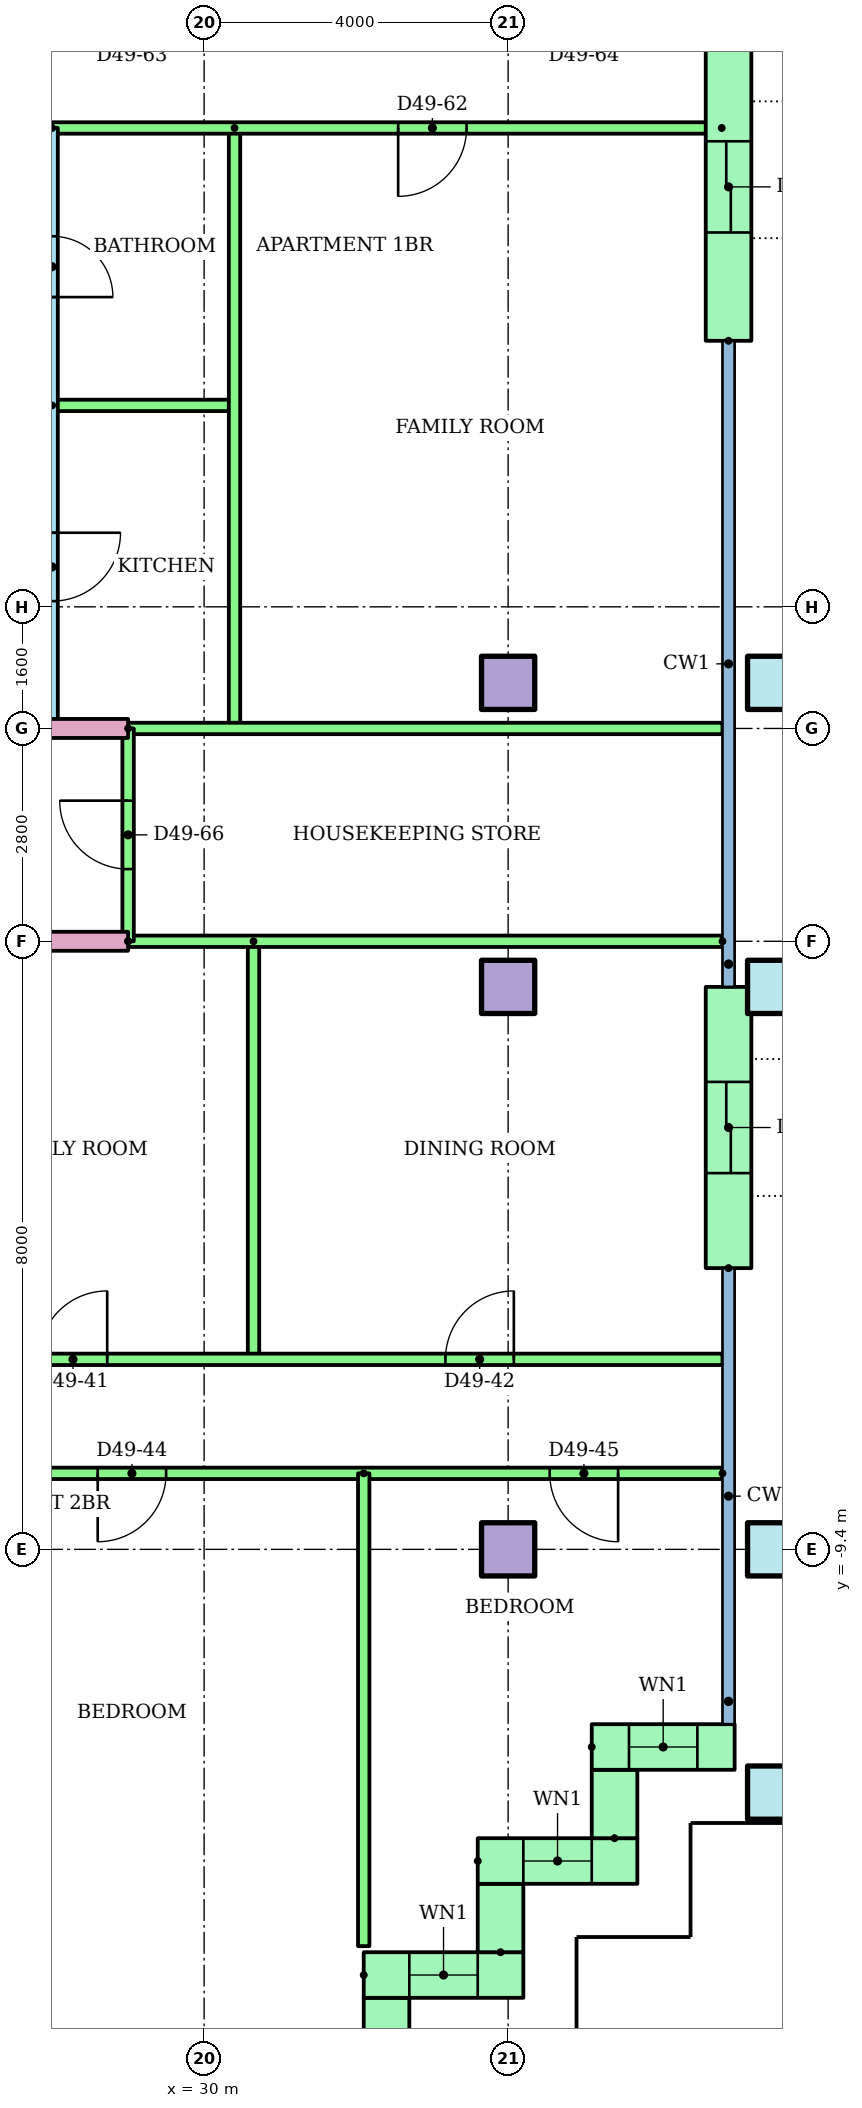
"""IFC4 building model, lengths in metres.
Left out: names, types, materials, properties, quantities, classifications, styles, units other than length and angle.
Written with IfcOpenShell. Run it as: python <this file> out.ifc"""

import sys

from ifc_helpers import new_model, si_unit, direction, frame, frame_2d, origin, origin_2d, place, context, subcontext, project, spatial, rectangle, hollow_rectangle, extrude, element, fill, save


model = new_model("IFC4")
c1 = context("Model", 3, precision=1e-05, world=origin(), true_north=direction((0.0, 1.0)))
c2 = subcontext(c1, "Body", "Model", "MODEL_VIEW")
j1 = project(units=[si_unit("LENGTHUNIT", "METRE"), si_unit("PLANEANGLEUNIT", "RADIAN")], contexts=[c1])
p1 = place(None, origin())
s1 = spatial("IfcSite", under=j1, at=p1, CompositionType="ELEMENT")
p2 = place(p1, origin())
s2 = spatial("IfcBuilding", under=s1, at=p2, CompositionType="ELEMENT")
p3 = place(p2, frame((0.0, 0.0, 187.7)))
s3 = spatial("IfcBuildingStorey", under=s2, at=p3, CompositionType="ELEMENT", Elevation=187.7)
p4 = place(p3, frame((37.5, -12.6, 0.0)))
e1 = element("IfcColumn", 1, at=p4, inside=s3, PredefinedType="COLUMN", context=c2, shape_type="SweptSolid", body=[
    extrude(hollow_rectangle(XDim=0.7, YDim=0.7, WallThickness=0.036, at=origin_2d()), origin(), (0.0, 0.0, 1.0), 3.2),
])
p5 = place(p3, frame((34.0, -9.4, 0.0)))
e2 = element("IfcColumn", 2, at=p5, inside=s3, PredefinedType="COLUMN", context=c2, shape_type="SweptSolid", body=[
    extrude(rectangle(XDim=0.7, YDim=0.7, at=origin_2d()), origin(), (0.0, 0.0, 1.0), 3.2),
])
p6 = place(p3, frame((37.5, -9.4, 0.0)))
e3 = element("IfcColumn", 3, at=p6, inside=s3, PredefinedType="COLUMN", context=c2, shape_type="SweptSolid", body=[
    extrude(hollow_rectangle(XDim=0.7, YDim=0.7, WallThickness=0.036, at=origin_2d()), origin(), (0.0, 0.0, 1.0), 3.2),
])
p7 = place(p3, frame((34.0, -2.0, 0.0)))
e4 = element("IfcColumn", 4, at=p7, inside=s3, PredefinedType="COLUMN", context=c2, shape_type="SweptSolid", body=[
    extrude(rectangle(XDim=0.7, YDim=0.7, at=origin_2d()), origin(), (0.0, 0.0, 1.0), 3.2),
])
p8 = place(p3, frame((37.5, -2.0, 0.0)))
e5 = element("IfcColumn", 5, at=p8, inside=s3, PredefinedType="COLUMN", context=c2, shape_type="SweptSolid", body=[
    extrude(hollow_rectangle(XDim=0.7, YDim=0.7, WallThickness=0.036, at=origin_2d()), origin(), (0.0, 0.0, 1.0), 3.2),
])
p9 = place(p3, frame((34.0, 2.0, 0.0)))
e6 = element("IfcColumn", 6, at=p9, inside=s3, PredefinedType="COLUMN", context=c2, shape_type="SweptSolid", body=[
    extrude(rectangle(XDim=0.7, YDim=0.7, at=origin_2d()), origin(), (0.0, 0.0, 1.0), 3.2),
])
p10 = place(p3, frame((37.5, 2.0, 0.0)))
e7 = element("IfcColumn", 7, at=p10, inside=s3, PredefinedType="COLUMN", context=c2, shape_type="SweptSolid", body=[
    extrude(hollow_rectangle(XDim=0.7, YDim=0.7, WallThickness=0.036, at=origin_2d()), origin(), (0.0, 0.0, 1.0), 3.2),
])
p11 = place(p3, frame((32.4, -16.58, 0.0), z_axis=(0.0, 0.0, 1.0), x_axis=(0.0, 1.0, 0.0)))
e8 = element("IfcWall", 8, at=p11, inside=s3, PredefinedType="STANDARD", context=c2, shape_type="SweptSolid", body=[
    extrude(rectangle(XDim=1.28, YDim=0.6, at=frame_2d((0.64, 0.0))), origin(), (0.0, 0.0, 1.0), 2.92),
])
p12 = place(p3, frame((32.1, -15.0, 0.0)))
e9 = element("IfcWall", 9, at=p12, inside=s3, PredefinedType="STANDARD", context=c2, shape_type="SweptSolid", body=[
    extrude(rectangle(XDim=2.1, YDim=0.6, at=frame_2d((1.05, 0.0))), origin(), (0.0, 0.0, 1.0), 2.92),
])
p13 = place(p12, frame((0.6, 0.0, 0.9)))
e10 = element("IfcOpeningElement", 10, at=p13, cuts=e9, PredefinedType="OPENING", context=c2, shape_type="SweptSolid", body=[
    extrude(rectangle(XDim=0.9, YDim=1.5, at=frame_2d((0.45, 0.75))), frame((0.0, 0.31, 0.0), z_axis=(0.0, -1.0, 0.0), x_axis=(1.0, 0.0, 0.0)), (0.0, 0.0, 1.0), 0.62),
])
p14 = place(p3, frame((33.9, -14.7, 0.0), z_axis=(0.0, 0.0, 1.0), x_axis=(0.0, 1.0, 0.0)))
e11 = element("IfcWall", 11, at=p14, inside=s3, PredefinedType="STANDARD", context=c2, shape_type="SweptSolid", body=[
    extrude(rectangle(XDim=0.9, YDim=0.6, at=frame_2d((0.45, 0.0))), origin(), (0.0, 0.0, 1.0), 2.92),
])
p15 = place(p3, frame((33.6, -13.5, 0.0)))
e12 = element("IfcWall", 12, at=p15, inside=s3, PredefinedType="STANDARD", context=c2, shape_type="SweptSolid", body=[
    extrude(rectangle(XDim=2.1, YDim=0.6, at=frame_2d((1.05, 0.0))), origin(), (0.0, 0.0, 1.0), 2.92),
])
p16 = place(p15, frame((0.6, 0.0, 0.9)))
e13 = element("IfcOpeningElement", 13, at=p16, cuts=e12, PredefinedType="OPENING", context=c2, shape_type="SweptSolid", body=[
    extrude(rectangle(XDim=0.9, YDim=1.5, at=frame_2d((0.45, 0.75))), frame((0.0, 0.31, 0.0), z_axis=(0.0, -1.0, 0.0), x_axis=(1.0, 0.0, 0.0)), (0.0, 0.0, 1.0), 0.62),
])
p17 = place(p3, frame((35.4, -13.2, 0.0), z_axis=(0.0, 0.0, 1.0), x_axis=(0.0, 1.0, 0.0)))
e14 = element("IfcWall", 14, at=p17, inside=s3, PredefinedType="STANDARD", context=c2, shape_type="SweptSolid", body=[
    extrude(rectangle(XDim=0.9, YDim=0.6, at=frame_2d((0.45, 0.0))), origin(), (0.0, 0.0, 1.0), 2.92),
])
p18 = place(p3, frame((35.1, -12.0, 0.0)))
e15 = element("IfcWall", 15, at=p18, inside=s3, PredefinedType="STANDARD", context=c2, shape_type="SweptSolid", body=[
    extrude(rectangle(XDim=1.88, YDim=0.6, at=frame_2d((0.94, 0.0))), origin(), (0.0, 0.0, 1.0), 2.92),
])
p19 = place(p18, frame((0.49, 0.0, 0.9)))
e16 = element("IfcOpeningElement", 16, at=p19, cuts=e15, PredefinedType="OPENING", context=c2, shape_type="SweptSolid", body=[
    extrude(rectangle(XDim=0.9, YDim=1.5, at=frame_2d((0.45, 0.75))), frame((0.0, 0.31, 0.0), z_axis=(0.0, -1.0, 0.0), x_axis=(1.0, 0.0, 0.0)), (0.0, 0.0, 1.0), 0.62),
])
p20 = place(p3, frame((36.9, -5.7, 0.0), z_axis=(0.0, 0.0, 1.0), x_axis=(0.0, 1.0, 0.0)))
e17 = element("IfcWall", 17, at=p20, inside=s3, PredefinedType="STANDARD", context=c2, shape_type="SweptSolid", body=[
    extrude(rectangle(XDim=3.7, YDim=0.6, at=frame_2d((1.85, 0.0))), origin(), (0.0, 0.0, 1.0), 2.92),
])
p21 = place(p20, frame((1.25, 0.0, 0.0)))
e18 = element("IfcOpeningElement", 18, at=p21, cuts=e17, PredefinedType="OPENING", context=c2, shape_type="SweptSolid", body=[
    extrude(rectangle(XDim=1.2, YDim=2.1, at=frame_2d((0.6, 1.05))), frame((0.0, 0.31, 0.0), z_axis=(0.0, -1.0, 0.0), x_axis=(1.0, 0.0, 0.0)), (0.0, 0.0, 1.0), 0.62),
])
p22 = place(p3, frame((36.9, 6.5, 0.0), z_axis=(0.0, 0.0, 1.0), x_axis=(0.0, 1.0, 0.0)))
e19 = element("IfcWall", 19, at=p22, inside=s3, PredefinedType="STANDARD", context=c2, shape_type="SweptSolid", body=[
    extrude(rectangle(XDim=4.5, YDim=0.6, at=frame_2d((2.25, 0.0))), origin(), (0.0, 0.0, 1.0), 2.92),
])
p23 = place(p22, frame((1.425, 0.0, 0.0)))
e20 = element("IfcOpeningElement", 20, at=p23, cuts=e19, PredefinedType="OPENING", context=c2, shape_type="SweptSolid", body=[
    extrude(rectangle(XDim=1.2, YDim=2.1, at=frame_2d((0.6, 1.05))), frame((0.0, 0.31, 0.0), z_axis=(0.0, -1.0, 0.0), x_axis=(1.0, 0.0, 0.0)), (0.0, 0.0, 1.0), 0.62),
])
p24 = place(p3, frame((30.65, -1.4, 0.0), z_axis=(0.0, 0.0, 1.0), x_axis=(0.0, -1.0, 0.0)))
e21 = element("IfcWall", 21, at=p24, inside=s3, PredefinedType="PARTITIONING", context=c2, shape_type="SweptSolid", body=[
    extrude(rectangle(XDim=5.5, YDim=0.15, at=frame_2d((2.75, 0.0))), origin(), (0.0, 0.0, 1.0), 2.4),
])
p25 = place(p3, frame((20.0, -6.9, 0.0)))
e22 = element("IfcWall", 22, at=p25, inside=s3, PredefinedType="PARTITIONING", context=c2, shape_type="SweptSolid", body=[
    extrude(rectangle(XDim=16.82, YDim=0.15, at=frame_2d((8.41, 0.0))), origin(), (0.0, 0.0, 1.0), 2.4),
])
p26 = place(p25, frame((3.7, 0.0, 0.0)))
e23 = element("IfcOpeningElement", 23, at=p26, cuts=e22, PredefinedType="OPENING", context=c2, shape_type="SweptSolid", body=[
    extrude(rectangle(XDim=0.9, YDim=2.1, at=frame_2d((0.45, 1.05))), frame((0.0, 0.085, 0.0), z_axis=(0.0, -1.0, 0.0), x_axis=(1.0, 0.0, 0.0)), (0.0, 0.0, 1.0), 0.17),
])
p27 = place(p25, frame((7.825, 0.0, 0.0)))
e24 = element("IfcOpeningElement", 24, at=p27, cuts=e22, PredefinedType="OPENING", context=c2, shape_type="SweptSolid", body=[
    extrude(rectangle(XDim=0.9, YDim=2.1, at=frame_2d((0.45, 1.05))), frame((0.0, 0.085, 0.0), z_axis=(0.0, -1.0, 0.0), x_axis=(1.0, 0.0, 0.0)), (0.0, 0.0, 1.0), 0.17),
])
p28 = place(p25, frame((13.175, 0.0, 0.0)))
e25 = element("IfcOpeningElement", 25, at=p28, cuts=e22, PredefinedType="OPENING", context=c2, shape_type="SweptSolid", body=[
    extrude(rectangle(XDim=0.9, YDim=2.1, at=frame_2d((0.45, 1.05))), frame((0.0, 0.085, 0.0), z_axis=(0.0, -1.0, 0.0), x_axis=(1.0, 0.0, 0.0)), (0.0, 0.0, 1.0), 0.17),
])
p29 = place(p3, frame((36.82, -8.4, 0.0), z_axis=(0.0, 0.0, 1.0), x_axis=(-1.0, 0.0, 0.0)))
e26 = element("IfcWall", 26, at=p29, inside=s3, PredefinedType="PARTITIONING", context=c2, shape_type="SweptSolid", body=[
    extrude(rectangle(XDim=18.82, YDim=0.15, at=frame_2d((9.41, 0.0))), origin(), (0.0, 0.0, 1.0), 2.4),
])
p30 = place(p29, frame((14.32, 0.0, 0.0)))
e27 = element("IfcOpeningElement", 27, at=p30, cuts=e26, PredefinedType="OPENING", context=c2, shape_type="SweptSolid", body=[
    extrude(rectangle(XDim=1.0, YDim=2.1, at=frame_2d((0.5, 1.05))), frame((0.0, 0.085, 0.0), z_axis=(0.0, -1.0, 0.0), x_axis=(1.0, 0.0, 0.0)), (0.0, 0.0, 1.0), 0.17),
])
p31 = place(p29, frame((7.32, 0.0, 0.0)))
e28 = element("IfcOpeningElement", 28, at=p31, cuts=e26, PredefinedType="OPENING", context=c2, shape_type="SweptSolid", body=[
    extrude(rectangle(XDim=0.9, YDim=2.1, at=frame_2d((0.45, 1.05))), frame((0.0, 0.085, 0.0), z_axis=(0.0, -1.0, 0.0), x_axis=(1.0, 0.0, 0.0)), (0.0, 0.0, 1.0), 0.17),
])
p32 = place(p29, frame((1.373, 0.0, 0.0)))
e29 = element("IfcOpeningElement", 29, at=p32, cuts=e26, PredefinedType="OPENING", context=c2, shape_type="SweptSolid", body=[
    extrude(rectangle(XDim=0.9, YDim=2.1, at=frame_2d((0.45, 1.05))), frame((0.0, 0.085, 0.0), z_axis=(0.0, -1.0, 0.0), x_axis=(1.0, 0.0, 0.0)), (0.0, 0.0, 1.0), 0.17),
])
p33 = place(p3, frame((32.1, -8.4, 0.0), z_axis=(0.0, 0.0, 1.0), x_axis=(0.0, -1.0, 0.0)))
e30 = element("IfcWall", 30, at=p33, inside=s3, PredefinedType="PARTITIONING", context=c2, shape_type="SweptSolid", body=[
    extrude(rectangle(XDim=6.22, YDim=0.15, at=frame_2d((3.11, 0.0))), origin(), (0.0, 0.0, 1.0), 2.4),
])
p34 = place(p3, frame((29.0, -1.4, 0.0), z_axis=(0.0, 0.0, 1.0), x_axis=(-1.0, 0.0, 0.0)))
e31 = element("IfcWall", 31, at=p34, inside=s3, PredefinedType="PARTITIONING", context=c2, shape_type="SweptSolid", body=[
    extrude(rectangle(XDim=15.0, YDim=0.25, at=frame_2d((7.5, 0.0))), origin(), (0.0, 0.0, 1.0), 2.4),
])
p35 = place(p34, frame((9.453, 0.0, 0.0)))
e32 = element("IfcOpeningElement", 32, at=p35, cuts=e31, PredefinedType="OPENING", context=c2, shape_type="SweptSolid", body=[
    extrude(rectangle(XDim=1.0, YDim=2.1, at=frame_2d((0.5, 1.05))), frame((0.0, 0.135, 0.0), z_axis=(0.0, -1.0, 0.0), x_axis=(1.0, 0.0, 0.0)), (0.0, 0.0, 1.0), 0.27),
])
p36 = place(p3, frame((36.82, -1.4, 0.0), z_axis=(0.0, 0.0, 1.0), x_axis=(-1.0, 0.0, 0.0)))
e33 = element("IfcWall", 33, at=p36, inside=s3, PredefinedType="PARTITIONING", context=c2, shape_type="SweptSolid", body=[
    extrude(rectangle(XDim=7.82, YDim=0.15, at=frame_2d((3.91, 0.0))), origin(), (0.0, 0.0, 1.0), 2.4),
])
p37 = place(p3, frame((28.0, 9.3, 0.0), z_axis=(0.0, 0.0, 1.0), x_axis=(0.0, -1.0, 0.0)))
e34 = element("IfcWall", 34, at=p37, inside=s3, PredefinedType="PARTITIONING", context=c2, shape_type="SweptSolid", body=[
    extrude(rectangle(XDim=7.9, YDim=0.15, at=frame_2d((3.95, 0.0))), origin(), (0.0, 0.0, 1.0), 2.4),
])
p38 = place(p37, frame((5.325, 0.0, 0.0)))
e35 = element("IfcOpeningElement", 35, at=p38, cuts=e34, PredefinedType="OPENING", context=c2, shape_type="SweptSolid", body=[
    extrude(rectangle(XDim=0.9, YDim=2.1, at=frame_2d((0.45, 1.05))), frame((0.0, 0.085, 0.0), z_axis=(0.0, -1.0, 0.0), x_axis=(1.0, 0.0, 0.0)), (0.0, 0.0, 1.0), 0.17),
])
p39 = place(p37, frame((1.425, 0.0, 0.0)))
e36 = element("IfcOpeningElement", 36, at=p39, cuts=e34, PredefinedType="OPENING", context=c2, shape_type="SweptSolid", body=[
    extrude(rectangle(XDim=0.8, YDim=2.1, at=frame_2d((0.4, 1.05))), frame((0.0, 0.085, 0.0), z_axis=(0.0, -1.0, 0.0), x_axis=(1.0, 0.0, 0.0)), (0.0, 0.0, 1.0), 0.17),
])
p40 = place(p3, frame((28.0, 5.65, 0.0)))
e37 = element("IfcWall", 37, at=p40, inside=s3, PredefinedType="PARTITIONING", context=c2, shape_type="SweptSolid", body=[
    extrude(rectangle(XDim=2.4, YDim=0.15, at=frame_2d((1.2, 0.0))), origin(), (0.0, 0.0, 1.0), 2.4),
])
p41 = place(p3, frame((30.4, 9.3, 0.0), z_axis=(0.0, 0.0, 1.0), x_axis=(0.0, -1.0, 0.0)))
e38 = element("IfcWall", 38, at=p41, inside=s3, PredefinedType="PARTITIONING", context=c2, shape_type="SweptSolid", body=[
    extrude(rectangle(XDim=7.9, YDim=0.15, at=frame_2d((3.95, 0.0))), origin(), (0.0, 0.0, 1.0), 2.4),
])
p42 = place(p3, frame((36.81, 9.3, 0.0), z_axis=(0.0, 0.0, 1.0), x_axis=(-1.0, 0.0, 0.0)))
e39 = element("IfcWall", 39, at=p42, inside=s3, PredefinedType="PARTITIONING", context=c2, shape_type="SweptSolid", body=[
    extrude(rectangle(XDim=8.81, YDim=0.15, at=frame_2d((4.405, 0.0))), origin(), (0.0, 0.0, 1.0), 2.4),
])
p43 = place(p42, frame((3.357, 0.0, 0.0)))
e40 = element("IfcOpeningElement", 40, at=p43, cuts=e39, PredefinedType="OPENING", context=c2, shape_type="SweptSolid", body=[
    extrude(rectangle(XDim=0.9, YDim=2.1, at=frame_2d((0.45, 1.05))), frame((0.0, 0.085, 0.0), z_axis=(0.0, -1.0, 0.0), x_axis=(1.0, 0.0, 0.0)), (0.0, 0.0, 1.0), 0.17),
])
p44 = place(p3, frame((14.0, 1.4, 0.0)))
e41 = element("IfcWall", 41, at=p44, inside=s3, PredefinedType="PARTITIONING", context=c2, shape_type="SweptSolid", body=[
    extrude(rectangle(XDim=15.0, YDim=0.25, at=frame_2d((7.5, 0.0))), origin(), (0.0, 0.0, 1.0), 2.4),
])
p45 = place(p44, frame((0.5, 0.0, 0.0)))
e42 = element("IfcOpeningElement", 42, at=p45, cuts=e41, PredefinedType="OPENING", context=c2, shape_type="SweptSolid", body=[
    extrude(rectangle(XDim=1.0, YDim=2.1, at=frame_2d((0.5, 1.05))), frame((0.0, 0.135, 0.0), z_axis=(0.0, -1.0, 0.0), x_axis=(1.0, 0.0, 0.0)), (0.0, 0.0, 1.0), 0.27),
])
p46 = place(p44, frame((12.547, 0.0, 0.0)))
e43 = element("IfcOpeningElement", 43, at=p46, cuts=e41, PredefinedType="OPENING", context=c2, shape_type="SweptSolid", body=[
    extrude(rectangle(XDim=1.0, YDim=2.1, at=frame_2d((0.5, 1.05))), frame((0.0, 0.135, 0.0), z_axis=(0.0, -1.0, 0.0), x_axis=(1.0, 0.0, 0.0)), (0.0, 0.0, 1.0), 0.27),
])
p47 = place(p3, frame((29.0, 1.4, 0.0)))
e44 = element("IfcWall", 44, at=p47, inside=s3, PredefinedType="PARTITIONING", context=c2, shape_type="SweptSolid", body=[
    extrude(rectangle(XDim=7.82, YDim=0.15, at=frame_2d((3.91, 0.0))), origin(), (0.0, 0.0, 1.0), 2.4),
])
p48 = place(p3, frame((29.0, -1.4, 0.0), z_axis=(0.0, 0.0, 1.0), x_axis=(0.0, 1.0, 0.0)))
e45 = element("IfcWall", 45, at=p48, inside=s3, PredefinedType="PARTITIONING", context=c2, shape_type="SweptSolid", body=[
    extrude(rectangle(XDim=2.8, YDim=0.15, at=frame_2d((1.4, 0.0))), origin(), (0.0, 0.0, 1.0), 2.4),
])
p49 = place(p48, frame((0.95, 0.0, 0.0)))
e46 = element("IfcOpeningElement", 46, at=p49, cuts=e45, PredefinedType="OPENING", context=c2, shape_type="SweptSolid", body=[
    extrude(rectangle(XDim=0.9, YDim=2.1, at=frame_2d((0.45, 1.05))), frame((0.0, 0.085, 0.0), z_axis=(0.0, -1.0, 0.0), x_axis=(1.0, 0.0, 0.0)), (0.0, 0.0, 1.0), 0.17),
])
p50 = place(p13, origin())
e47 = element("IfcWindow", 47, at=p50, inside=s3, PartitioningType="SINGLE_PANEL", PredefinedType="WINDOW", context=c2, shape_type="SweptSolid", body=[
    extrude(rectangle(XDim=0.9, YDim=1.5, at=frame_2d((0.45, 0.75))), frame((0.0, 0.03, 0.0), z_axis=(0.0, -1.0, 0.0), x_axis=(1.0, 0.0, 0.0)), (0.0, 0.0, 1.0), 0.06),
])
fill(e10, e47)
p51 = place(p16, origin())
e48 = element("IfcWindow", 48, at=p51, inside=s3, PartitioningType="SINGLE_PANEL", PredefinedType="WINDOW", context=c2, shape_type="SweptSolid", body=[
    extrude(rectangle(XDim=0.9, YDim=1.5, at=frame_2d((0.45, 0.75))), frame((0.0, 0.03, 0.0), z_axis=(0.0, -1.0, 0.0), x_axis=(1.0, 0.0, 0.0)), (0.0, 0.0, 1.0), 0.06),
])
fill(e13, e48)
p52 = place(p19, origin())
e49 = element("IfcWindow", 49, at=p52, inside=s3, PartitioningType="SINGLE_PANEL", PredefinedType="WINDOW", context=c2, shape_type="SweptSolid", body=[
    extrude(rectangle(XDim=0.9, YDim=1.5, at=frame_2d((0.45, 0.75))), frame((0.0, 0.03, 0.0), z_axis=(0.0, -1.0, 0.0), x_axis=(1.0, 0.0, 0.0)), (0.0, 0.0, 1.0), 0.06),
])
fill(e16, e49)
p53 = place(p27, origin())
e50 = element("IfcDoor", 50, at=p53, inside=s3, OperationType="SINGLE_SWING_RIGHT", PredefinedType="DOOR", context=c2, shape_type="SweptSolid", body=[
    extrude(rectangle(XDim=0.9, YDim=2.1, at=frame_2d((0.45, 1.05))), frame((0.0, 0.025, 0.0), z_axis=(0.0, -1.0, 0.0), x_axis=(1.0, 0.0, 0.0)), (0.0, 0.0, 1.0), 0.05),
])
fill(e24, e50)
p54 = place(p28, origin())
e51 = element("IfcDoor", 51, at=p54, inside=s3, OperationType="SINGLE_SWING_RIGHT", PredefinedType="DOOR", context=c2, shape_type="SweptSolid", body=[
    extrude(rectangle(XDim=0.9, YDim=2.1, at=frame_2d((0.45, 1.05))), frame((0.0, 0.025, 0.0), z_axis=(0.0, -1.0, 0.0), x_axis=(1.0, 0.0, 0.0)), (0.0, 0.0, 1.0), 0.05),
])
fill(e25, e51)
p55 = place(p31, origin())
e52 = element("IfcDoor", 52, at=p55, inside=s3, OperationType="SINGLE_SWING_RIGHT", PredefinedType="DOOR", context=c2, shape_type="SweptSolid", body=[
    extrude(rectangle(XDim=0.9, YDim=2.1, at=frame_2d((0.45, 1.05))), frame((0.0, 0.025, 0.0), z_axis=(0.0, -1.0, 0.0), x_axis=(1.0, 0.0, 0.0)), (0.0, 0.0, 1.0), 0.05),
])
fill(e28, e52)
p56 = place(p32, origin())
e53 = element("IfcDoor", 53, at=p56, inside=s3, OperationType="SINGLE_SWING_LEFT", PredefinedType="DOOR", context=c2, shape_type="SweptSolid", body=[
    extrude(rectangle(XDim=0.9, YDim=2.1, at=frame_2d((0.45, 1.05))), frame((0.0, 0.025, 0.0), z_axis=(0.0, -1.0, 0.0), x_axis=(1.0, 0.0, 0.0)), (0.0, 0.0, 1.0), 0.05),
])
fill(e29, e53)
p57 = place(p38, origin())
e54 = element("IfcDoor", 54, at=p57, inside=s3, OperationType="SINGLE_SWING_LEFT", PredefinedType="DOOR", context=c2, shape_type="SweptSolid", body=[
    extrude(rectangle(XDim=0.9, YDim=2.1, at=frame_2d((0.45, 1.05))), frame((0.0, 0.025, 0.0), z_axis=(0.0, -1.0, 0.0), x_axis=(1.0, 0.0, 0.0)), (0.0, 0.0, 1.0), 0.05),
])
fill(e35, e54)
p58 = place(p39, origin())
e55 = element("IfcDoor", 55, at=p58, inside=s3, OperationType="SINGLE_SWING_RIGHT", PredefinedType="DOOR", context=c2, shape_type="SweptSolid", body=[
    extrude(rectangle(XDim=0.8, YDim=2.1, at=frame_2d((0.4, 1.05))), frame((0.0, 0.025, 0.0), z_axis=(0.0, -1.0, 0.0), x_axis=(1.0, 0.0, 0.0)), (0.0, 0.0, 1.0), 0.05),
])
fill(e36, e55)
p59 = place(p43, origin())
e56 = element("IfcDoor", 56, at=p59, inside=s3, OperationType="SINGLE_SWING_RIGHT", PredefinedType="DOOR", context=c2, shape_type="SweptSolid", body=[
    extrude(rectangle(XDim=0.9, YDim=2.1, at=frame_2d((0.45, 1.05))), frame((0.0, 0.025, 0.0), z_axis=(0.0, -1.0, 0.0), x_axis=(1.0, 0.0, 0.0)), (0.0, 0.0, 1.0), 0.05),
])
fill(e40, e56)
p60 = place(p49, origin())
e57 = element("IfcDoor", 57, at=p60, inside=s3, OperationType="SINGLE_SWING_RIGHT", PredefinedType="DOOR", context=c2, shape_type="SweptSolid", body=[
    extrude(rectangle(XDim=0.9, YDim=2.1, at=frame_2d((0.45, 1.05))), frame((0.0, 0.025, 0.0), z_axis=(0.0, -1.0, 0.0), x_axis=(1.0, 0.0, 0.0)), (0.0, 0.0, 1.0), 0.05),
])
fill(e46, e57)
p61 = place(p21, origin())
e58 = element("IfcDoor", 58, at=p61, inside=s3, OperationType="SLIDING_TO_LEFT", PredefinedType="DOOR", context=c2, shape_type="SweptSolid", body=[
    extrude(rectangle(XDim=1.2, YDim=2.1, at=frame_2d((0.6, 1.05))), frame((0.0, 0.025, 0.0), z_axis=(0.0, -1.0, 0.0), x_axis=(1.0, 0.0, 0.0)), (0.0, 0.0, 1.0), 0.05),
])
fill(e18, e58)
p62 = place(p23, origin())
e59 = element("IfcDoor", 59, at=p62, inside=s3, OperationType="SLIDING_TO_LEFT", PredefinedType="DOOR", context=c2, shape_type="SweptSolid", body=[
    extrude(rectangle(XDim=1.2, YDim=2.1, at=frame_2d((0.6, 1.05))), frame((0.0, 0.025, 0.0), z_axis=(0.0, -1.0, 0.0), x_axis=(1.0, 0.0, 0.0)), (0.0, 0.0, 1.0), 0.05),
])
fill(e20, e59)
save(model, sys.argv[1])
